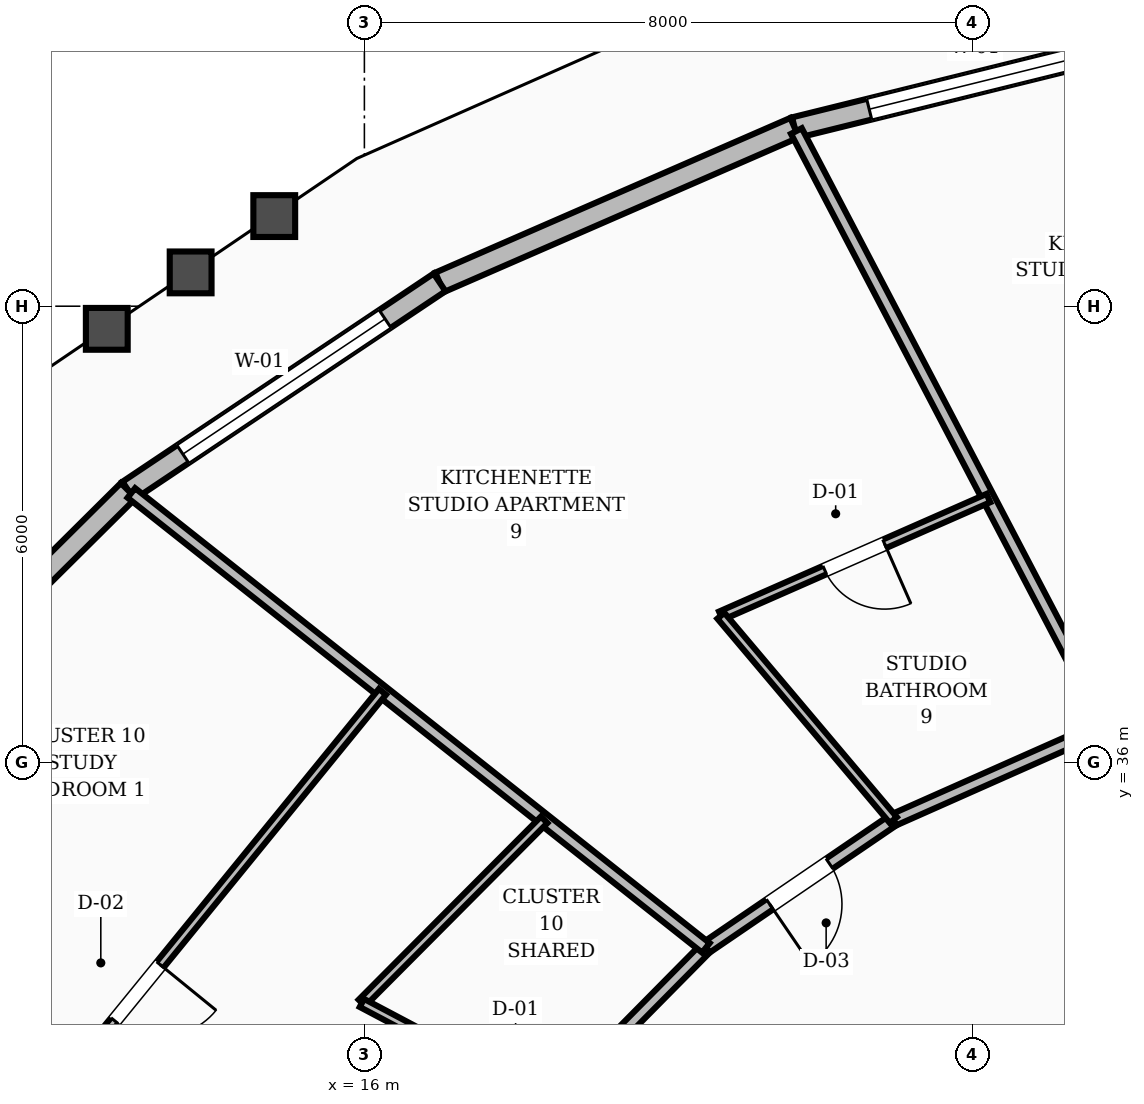
"""IFC4 building model, lengths in metres.
Left out: names, types, materials, properties, quantities, classifications, styles, units other than length and angle.
Written with IfcOpenShell. Run it as: python <this file> out.ifc"""

import sys

from ifc_helpers import new_model, si_unit, direction, frame, frame_2d, origin, place, context, subcontext, project, spatial, rectangle, extrude, element, fill, save


model = new_model("IFC4")
c1 = context("Model", 3, precision=1e-05, world=origin(), true_north=direction((0.0, 1.0)))
c2 = subcontext(c1, "Body", "Model", "MODEL_VIEW")
j1 = project(units=[si_unit("LENGTHUNIT", "METRE"), si_unit("PLANEANGLEUNIT", "RADIAN")], contexts=[c1])
p1 = place(None, origin())
s1 = spatial("IfcSite", under=j1, at=p1, CompositionType="ELEMENT")
p2 = place(p1, origin())
s2 = spatial("IfcBuilding", under=s1, at=p2, CompositionType="ELEMENT")
p3 = place(p2, frame((0.0, 0.0, 84.4)))
s3 = spatial("IfcBuildingStorey", under=s2, at=p3, CompositionType="ELEMENT", Elevation=84.4)
p4 = place(p3, frame((26.729, 45.602, 0.0), z_axis=(0.0, 0.0, 1.0), x_axis=(-0.970758207565, -0.240059372749, 0.0)))
e1 = element("IfcWall", 1, at=p4, inside=s3, PredefinedType="STANDARD", context=c2, shape_type="SweptSolid", body=[
    extrude(rectangle(XDim=5.221, YDim=0.28, at=frame_2d((2.611, 0.0))), origin(), (0.0, 0.0, 1.0), 2.71),
])
p5 = place(p4, frame((1.01, 0.0, 0.8)))
e2 = element("IfcOpeningElement", 2, at=p5, cuts=e1, PredefinedType="OPENING", context=c2, shape_type="SweptSolid", body=[
    extrude(rectangle(XDim=3.2, YDim=1.65, at=frame_2d((1.6, 0.825))), frame((0.0, 0.15, 0.0), z_axis=(0.0, -1.0, 0.0), x_axis=(1.0, 0.0, 0.0)), (0.0, 0.0, 1.0), 0.3),
])
p6 = place(p3, frame((21.66, 44.349, 0.0), z_axis=(0.0, 0.0, 1.0), x_axis=(-0.916774249717, -0.399405777445, 0.0)))
e3 = element("IfcWall", 3, at=p6, inside=s3, PredefinedType="STANDARD", context=c2, shape_type="SweptSolid", body=[
    extrude(rectangle(XDim=5.095, YDim=0.28, at=frame_2d((2.548, 0.0))), origin(), (0.0, 0.0, 1.0), 2.71),
])
p7 = place(p3, frame((16.989, 42.313, 0.0), z_axis=(0.0, 0.0, 1.0), x_axis=(-0.831134194268, -0.55607189384, 0.0)))
e4 = element("IfcWall", 4, at=p7, inside=s3, PredefinedType="STANDARD", context=c2, shape_type="SweptSolid", body=[
    extrude(rectangle(XDim=4.926, YDim=0.28, at=frame_2d((2.463, 0.0))), origin(), (0.0, 0.0, 1.0), 2.71),
])
p8 = place(p7, frame((0.863, 0.0, 0.8)))
e5 = element("IfcOpeningElement", 5, at=p8, cuts=e4, PredefinedType="OPENING", context=c2, shape_type="SweptSolid", body=[
    extrude(rectangle(XDim=3.2, YDim=1.65, at=frame_2d((1.6, 0.825))), frame((0.0, 0.15, 0.0), z_axis=(0.0, -1.0, 0.0), x_axis=(1.0, 0.0, 0.0)), (0.0, 0.0, 1.0), 0.3),
])
p9 = place(p3, frame((12.895, 39.574, 0.0), z_axis=(0.0, 0.0, 1.0), x_axis=(-0.709499676925, -0.704705760189, 0.0)))
e6 = element("IfcWall", 6, at=p9, inside=s3, PredefinedType="STANDARD", context=c2, shape_type="SweptSolid", body=[
    extrude(rectangle(XDim=4.736, YDim=0.28, at=frame_2d((2.368, 0.0))), origin(), (0.0, 0.0, 1.0), 2.71),
])
p10 = place(p3, frame((25.772, 36.489, 0.0), z_axis=(0.0, 0.0, 1.0), x_axis=(-0.913952123493, -0.405822024984, 0.0)))
e7 = element("IfcWall", 7, at=p10, inside=s3, PredefinedType="SOLIDWALL", context=c2, shape_type="SweptSolid", body=[
    extrude(rectangle(XDim=3.078, YDim=0.16, at=frame_2d((1.539, 0.0))), origin(), (0.0, 0.0, 1.0), 2.71),
])
p11 = place(p3, frame((22.959, 35.24, 0.0), z_axis=(0.0, 0.0, 1.0), x_axis=(-0.826293096206, -0.56324037423, 0.0)))
e8 = element("IfcWall", 8, at=p11, inside=s3, PredefinedType="SOLIDWALL", context=c2, shape_type="SweptSolid", body=[
    extrude(rectangle(XDim=2.985, YDim=0.16, at=frame_2d((1.492, 0.0))), origin(), (0.0, 0.0, 1.0), 2.71),
])
p12 = place(p11, frame((1.017, 0.0, 0.0)))
e9 = element("IfcOpeningElement", 9, at=p12, cuts=e8, PredefinedType="OPENING", context=c2, shape_type="SweptSolid", body=[
    extrude(rectangle(XDim=0.95, YDim=2.1, at=frame_2d((0.475, 1.05))), frame((0.0, 0.09, 0.0), z_axis=(0.0, -1.0, 0.0), x_axis=(1.0, 0.0, 0.0)), (0.0, 0.0, 1.0), 0.18),
])
p13 = place(p3, frame((20.492, 33.559, 0.0), z_axis=(0.0, 0.0, 1.0), x_axis=(-0.702811997, -0.711375636969, 0.0)))
e10 = element("IfcWall", 10, at=p13, inside=s3, PredefinedType="SOLIDWALL", context=c2, shape_type="SweptSolid", body=[
    extrude(rectangle(XDim=2.879, YDim=0.16, at=frame_2d((1.44, 0.0))), origin(), (0.0, 0.0, 1.0), 2.71),
])
p14 = place(p3, frame((25.772, 36.489, 0.0), z_axis=(0.0, 0.0, 1.0), x_axis=(-0.463546676058, 0.886072502178, 0.0)))
e11 = element("IfcWall", 11, at=p14, inside=s3, PredefinedType="SOLIDWALL", context=c2, shape_type="SweptSolid", body=[
    extrude(rectangle(XDim=8.82, YDim=0.16, at=frame_2d((4.41, 0.0))), origin(), (0.0, 0.0, 1.0), 2.71),
])
p15 = place(p3, frame((24.21, 39.476, 0.0), z_axis=(0.0, 0.0, 1.0), x_axis=(-0.915386176675, -0.402576884026, 0.0)))
e12 = element("IfcWall", 12, at=p15, inside=s3, PredefinedType="PARTITIONING", context=c2, shape_type="SweptSolid", body=[
    extrude(rectangle(XDim=3.845, YDim=0.12, at=frame_2d((1.922, 0.0))), origin(), (0.0, 0.0, 1.0), 2.71),
])
p16 = place(p15, frame((1.492, 0.0, 0.0)))
e13 = element("IfcOpeningElement", 13, at=p16, cuts=e12, PredefinedType="OPENING", context=c2, shape_type="SweptSolid", body=[
    extrude(rectangle(XDim=0.86, YDim=2.1, at=frame_2d((0.43, 1.05))), frame((0.0, 0.07, 0.0), z_axis=(0.0, -1.0, 0.0), x_axis=(1.0, 0.0, 0.0)), (0.0, 0.0, 1.0), 0.14),
])
p17 = place(p3, frame((22.959, 35.24, 0.0), z_axis=(0.0, 0.0, 1.0), x_axis=(-0.644964696284, 0.764212366131, 0.0)))
e14 = element("IfcWall", 14, at=p17, inside=s3, PredefinedType="PARTITIONING", context=c2, shape_type="SweptSolid", body=[
    extrude(rectangle(XDim=3.517, YDim=0.12, at=frame_2d((1.759, 0.0))), origin(), (0.0, 0.0, 1.0), 2.71),
])
p18 = place(p3, frame((20.492, 33.559, 0.0), z_axis=(0.0, 0.0, 1.0), x_axis=(-0.784008851618, 0.620749644047, 0.0)))
e15 = element("IfcWall", 15, at=p18, inside=s3, PredefinedType="SOLIDWALL", context=c2, shape_type="SweptSolid", body=[
    extrude(rectangle(XDim=9.641, YDim=0.16, at=frame_2d((4.82, 0.0))), origin(), (0.0, 0.0, 1.0), 2.71),
])
p19 = place(p3, frame((18.365, 35.243, 0.0), z_axis=(0.0, 0.0, 1.0), x_axis=(-0.705416994653, -0.708792539221, 0.0)))
e16 = element("IfcWall", 16, at=p19, inside=s3, PredefinedType="PARTITIONING", context=c2, shape_type="SweptSolid", body=[
    extrude(rectangle(XDim=3.399, YDim=0.12, at=frame_2d((1.7, 0.0))), origin(), (0.0, 0.0, 1.0), 2.71),
])
p20 = place(p3, frame((18.469, 31.51, 0.0), z_axis=(0.0, 0.0, 1.0), x_axis=(-0.883962018059, 0.467558713563, 0.0)))
e17 = element("IfcWall", 17, at=p20, inside=s3, PredefinedType="PARTITIONING", context=c2, shape_type="SweptSolid", body=[
    extrude(rectangle(XDim=2.83, YDim=0.12, at=frame_2d((1.415, 0.0))), origin(), (0.0, 0.0, 1.0), 2.71),
])
p21 = place(p20, frame((0.44, 0.0, 0.0)))
e18 = element("IfcOpeningElement", 18, at=p21, cuts=e17, PredefinedType="OPENING", context=c2, shape_type="SweptSolid", body=[
    extrude(rectangle(XDim=0.86, YDim=2.1, at=frame_2d((0.43, 1.05))), frame((0.0, 0.07, 0.0), z_axis=(0.0, -1.0, 0.0), x_axis=(1.0, 0.0, 0.0)), (0.0, 0.0, 1.0), 0.14),
])
p22 = place(p3, frame((16.238, 36.927, 0.0), z_axis=(0.0, 0.0, 1.0), x_axis=(-0.631616835391, -0.7752807061, 0.0)))
e19 = element("IfcWall", 19, at=p22, inside=s3, PredefinedType="PARTITIONING", context=c2, shape_type="SweptSolid", body=[
    extrude(rectangle(XDim=7.651, YDim=0.12, at=frame_2d((3.825, 0.0))), origin(), (0.0, 0.0, 1.0), 2.71),
])
p23 = place(p22, frame((4.631, 0.0, 0.0)))
e20 = element("IfcOpeningElement", 20, at=p23, cuts=e19, PredefinedType="OPENING", context=c2, shape_type="SweptSolid", body=[
    extrude(rectangle(XDim=0.95, YDim=2.1, at=frame_2d((0.475, 1.05))), frame((0.0, 0.07, 0.0), z_axis=(0.0, -1.0, 0.0), x_axis=(1.0, 0.0, 0.0)), (0.0, 0.0, 1.0), 0.14),
])
p24 = place(p5, origin())
e21 = element("IfcWindow", 21, at=p24, inside=s3, PartitioningType="SINGLE_PANEL", PredefinedType="WINDOW", context=c2, shape_type="SweptSolid", body=[
    extrude(rectangle(XDim=3.2, YDim=1.65, at=frame_2d((1.6, 0.825))), frame((0.0, 0.03, 0.0), z_axis=(0.0, -1.0, 0.0), x_axis=(1.0, 0.0, 0.0)), (0.0, 0.0, 1.0), 0.06),
])
fill(e2, e21)
p25 = place(p8, origin())
e22 = element("IfcWindow", 22, at=p25, inside=s3, PartitioningType="SINGLE_PANEL", PredefinedType="WINDOW", context=c2, shape_type="SweptSolid", body=[
    extrude(rectangle(XDim=3.2, YDim=1.65, at=frame_2d((1.6, 0.825))), frame((0.0, 0.03, 0.0), z_axis=(0.0, -1.0, 0.0), x_axis=(1.0, 0.0, 0.0)), (0.0, 0.0, 1.0), 0.06),
])
fill(e5, e22)
p26 = place(p16, origin())
e23 = element("IfcDoor", 23, at=p26, inside=s3, OperationType="SINGLE_SWING_LEFT", PredefinedType="DOOR", context=c2, shape_type="SweptSolid", body=[
    extrude(rectangle(XDim=0.86, YDim=2.1, at=frame_2d((0.43, 1.05))), frame((0.0, 0.025, 0.0), z_axis=(0.0, -1.0, 0.0), x_axis=(1.0, 0.0, 0.0)), (0.0, 0.0, 1.0), 0.05),
])
fill(e13, e23)
p27 = place(p12, origin())
e24 = element("IfcDoor", 24, at=p27, inside=s3, OperationType="SINGLE_SWING_RIGHT", PredefinedType="DOOR", context=c2, shape_type="SweptSolid", body=[
    extrude(rectangle(XDim=0.95, YDim=2.1, at=frame_2d((0.475, 1.05))), frame((0.0, 0.025, 0.0), z_axis=(0.0, -1.0, 0.0), x_axis=(1.0, 0.0, 0.0)), (0.0, 0.0, 1.0), 0.05),
])
fill(e9, e24)
p28 = place(p23, origin())
e25 = element("IfcDoor", 25, at=p28, inside=s3, OperationType="SINGLE_SWING_LEFT", PredefinedType="DOOR", context=c2, shape_type="SweptSolid", body=[
    extrude(rectangle(XDim=0.95, YDim=2.1, at=frame_2d((0.475, 1.05))), frame((0.0, 0.025, 0.0), z_axis=(0.0, -1.0, 0.0), x_axis=(1.0, 0.0, 0.0)), (0.0, 0.0, 1.0), 0.05),
])
fill(e20, e25)
save(model, sys.argv[1])
